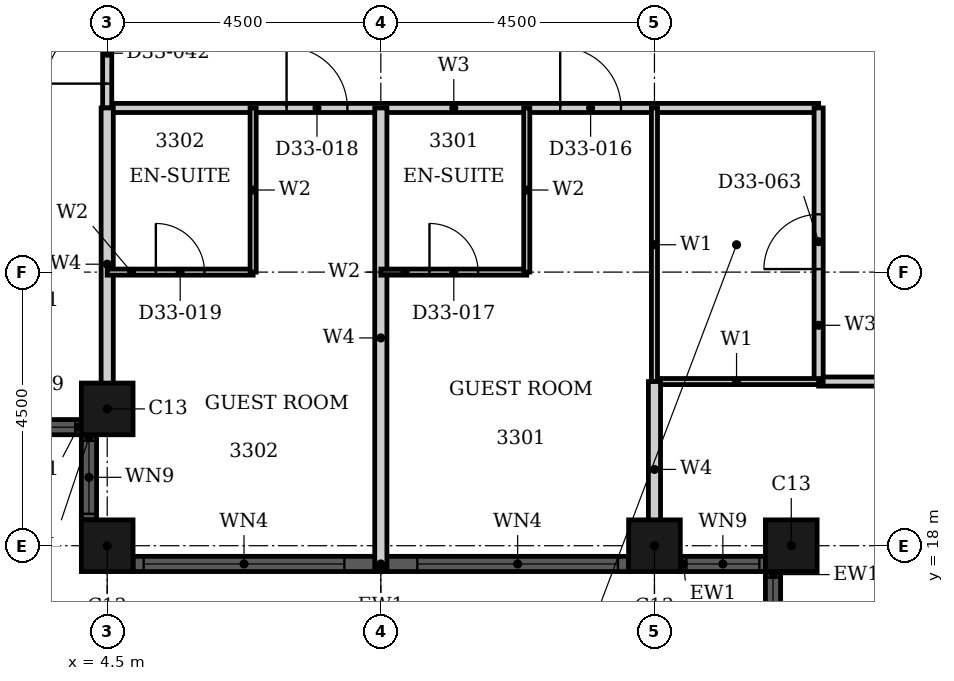
"""IFC4 building model, lengths in metres.
Left out: names, types, materials, properties, quantities, classifications, styles, units other than length and angle.
Written with IfcOpenShell. Run it as: python <this file> out.ifc"""

import sys

from ifc_helpers import new_model, si_unit, direction, frame, frame_2d, origin, origin_2d, place, context, subcontext, project, spatial, rectangle, hollow_rectangle, extrude, element, fill, save


model = new_model("IFC4")
c1 = context("Model", 3, precision=1e-05, world=origin(), true_north=direction((0.0, 1.0)))
c2 = subcontext(c1, "Body", "Model", "MODEL_VIEW")
j1 = project(units=[si_unit("LENGTHUNIT", "METRE"), si_unit("PLANEANGLEUNIT", "RADIAN")], contexts=[c1])
p1 = place(None, origin())
s1 = spatial("IfcSite", under=j1, at=p1, CompositionType="ELEMENT")
p2 = place(p1, origin())
s2 = spatial("IfcBuilding", under=s1, at=p2, CompositionType="ELEMENT")
p3 = place(p2, frame((0.0, 0.0, 133.2)))
s3 = spatial("IfcBuildingStorey", under=s2, at=p3, CompositionType="ELEMENT", Elevation=133.2)
for number, where, z_axis, x_axis in (
    (1, (4.5, 20.25, 0.0), (0.0, 0.0, 1.0), (1.0, 0.0, 0.0)),
    (2, (4.5, 18.0, 0.0), (0.0, 0.0, 1.0), (1.0, 0.0, 0.0)),
    (3, (13.5, 18.0, 0.0), (0.0, 0.0, 1.0), (1.0, 0.0, 0.0)),
    (4, (15.75, 18.0, 0.0), (0.0, 0.0, 1.0), (1.0, 0.0, 0.0)),
):
    element("IfcColumn", number, at=place(p3, frame(where, z_axis=z_axis, x_axis=x_axis)), inside=s3, PredefinedType="COLUMN", context=c2, shape_type="SweptSolid", body=[
        extrude(hollow_rectangle(XDim=0.85, YDim=0.85, WallThickness=0.026, at=origin_2d()), origin(), (0.0, 0.0, 1.0), 3.6),
    ])
p4 = place(p3, frame((2.675, 19.95, 0.0), z_axis=(0.0, 0.0, 1.0), x_axis=(1.0, 0.0, 0.0)))
e5 = element("IfcWall", 5, at=p4, inside=s3, PredefinedType="SOLIDWALL", context=c2, shape_type="SweptSolid", body=[
    extrude(rectangle(XDim=1.4, YDim=0.25, at=frame_2d((0.7, 0.0))), origin(), (0.0, 0.0, 1.0), 3.6),
])
p5 = place(p4, frame((0.1, 0.0, 0.9)))
e6 = element("IfcOpeningElement", 6, at=p5, cuts=e5, PredefinedType="OPENING", context=c2, shape_type="SweptSolid", body=[
    extrude(rectangle(XDim=1.2, YDim=2.08, at=frame_2d((0.6, 1.04))), frame((0.0, 0.135, 0.0), z_axis=(0.0, -1.0, 0.0), x_axis=(1.0, 0.0, 0.0)), (0.0, 0.0, 1.0), 0.27),
])
p6 = place(p3, frame((4.2, 19.825, 0.0), z_axis=(0.0, 0.0, 1.0), x_axis=(0.0, -1.0, 0.0)))
e7 = element("IfcWall", 7, at=p6, inside=s3, PredefinedType="SOLIDWALL", context=c2, shape_type="SweptSolid", body=[
    extrude(rectangle(XDim=1.4, YDim=0.25, at=frame_2d((0.7, 0.0))), origin(), (0.0, 0.0, 1.0), 3.6),
])
p7 = place(p6, frame((0.1, 0.0, 0.9)))
e8 = element("IfcOpeningElement", 8, at=p7, cuts=e7, PredefinedType="OPENING", context=c2, shape_type="SweptSolid", body=[
    extrude(rectangle(XDim=1.2, YDim=2.08, at=frame_2d((0.6, 1.04))), frame((0.0, 0.135, 0.0), z_axis=(0.0, -1.0, 0.0), x_axis=(1.0, 0.0, 0.0)), (0.0, 0.0, 1.0), 0.27),
])
p8 = place(p3, frame((4.925, 17.7, 0.0), z_axis=(0.0, 0.0, 1.0), x_axis=(1.0, 0.0, 0.0)))
e9 = element("IfcWall", 9, at=p8, inside=s3, PredefinedType="SOLIDWALL", context=c2, shape_type="SweptSolid", body=[
    extrude(rectangle(XDim=8.15, YDim=0.25, at=frame_2d((4.075, 0.0))), origin(), (0.0, 0.0, 1.0), 3.6),
])
p9 = place(p8, frame((0.175, 0.0, 0.9)))
e10 = element("IfcOpeningElement", 10, at=p9, cuts=e9, PredefinedType="OPENING", context=c2, shape_type="SweptSolid", body=[
    extrude(rectangle(XDim=3.3, YDim=2.08, at=frame_2d((1.65, 1.04))), frame((0.0, 0.135, 0.0), z_axis=(0.0, -1.0, 0.0), x_axis=(1.0, 0.0, 0.0)), (0.0, 0.0, 1.0), 0.27),
])
p10 = place(p8, frame((4.675, 0.0, 0.9)))
e11 = element("IfcOpeningElement", 11, at=p10, cuts=e9, PredefinedType="OPENING", context=c2, shape_type="SweptSolid", body=[
    extrude(rectangle(XDim=3.3, YDim=2.08, at=frame_2d((1.65, 1.04))), frame((0.0, 0.135, 0.0), z_axis=(0.0, -1.0, 0.0), x_axis=(1.0, 0.0, 0.0)), (0.0, 0.0, 1.0), 0.27),
])
p11 = place(p3, frame((13.925, 17.7, 0.0), z_axis=(0.0, 0.0, 1.0), x_axis=(1.0, 0.0, 0.0)))
e12 = element("IfcWall", 12, at=p11, inside=s3, PredefinedType="SOLIDWALL", context=c2, shape_type="SweptSolid", body=[
    extrude(rectangle(XDim=1.4, YDim=0.25, at=frame_2d((0.7, 0.0))), origin(), (0.0, 0.0, 1.0), 3.6),
])
p12 = place(p11, frame((0.1, 0.0, 0.9)))
e13 = element("IfcOpeningElement", 13, at=p12, cuts=e12, PredefinedType="OPENING", context=c2, shape_type="SweptSolid", body=[
    extrude(rectangle(XDim=1.2, YDim=2.08, at=frame_2d((0.6, 1.04))), frame((0.0, 0.135, 0.0), z_axis=(0.0, -1.0, 0.0), x_axis=(1.0, 0.0, 0.0)), (0.0, 0.0, 1.0), 0.27),
])
p13 = place(p3, frame((15.45, 17.575, 0.0), z_axis=(0.0, 0.0, 1.0), x_axis=(0.0, -1.0, 0.0)))
e14 = element("IfcWall", 14, at=p13, inside=s3, PredefinedType="SOLIDWALL", context=c2, shape_type="SweptSolid", body=[
    extrude(rectangle(XDim=1.4, YDim=0.25, at=frame_2d((0.7, 0.0))), origin(), (0.0, 0.0, 1.0), 3.6),
])
p14 = place(p13, frame((0.1, 0.0, 0.9)))
e15 = element("IfcOpeningElement", 15, at=p14, cuts=e14, PredefinedType="OPENING", context=c2, shape_type="SweptSolid", body=[
    extrude(rectangle(XDim=1.2, YDim=2.08, at=frame_2d((0.6, 1.04))), frame((0.0, 0.135, 0.0), z_axis=(0.0, -1.0, 0.0), x_axis=(1.0, 0.0, 0.0)), (0.0, 0.0, 1.0), 0.27),
])
p15 = place(p3, frame((16.2, 20.7, 0.0), z_axis=(0.0, 0.0, 1.0), x_axis=(1.0, 0.0, 0.0)))
e16 = element("IfcWall", 16, at=p15, inside=s3, PredefinedType="PARTITIONING", context=c2, shape_type="SweptSolid", body=[
    extrude(rectangle(XDim=13.5, YDim=0.15, at=frame_2d((6.75, 0.0))), origin(), (0.0, 0.0, 1.0), 3.3),
])
p16 = place(p15, frame((4.75, 0.0, 0.0)))
e17 = element("IfcOpeningElement", 17, at=p16, cuts=e16, PredefinedType="OPENING", context=c2, shape_type="SweptSolid", body=[
    extrude(rectangle(XDim=1.0, YDim=2.1, at=frame_2d((0.5, 1.05))), frame((0.0, 0.085, 0.0), z_axis=(0.0, -1.0, 0.0), x_axis=(1.0, 0.0, 0.0)), (0.0, 0.0, 1.0), 0.17),
])
p17 = place(p15, frame((9.45, 0.0, 0.0)))
e18 = element("IfcOpeningElement", 18, at=p17, cuts=e16, PredefinedType="OPENING", context=c2, shape_type="SweptSolid", body=[
    extrude(rectangle(XDim=0.9, YDim=2.1, at=frame_2d((0.45, 1.05))), frame((0.0, 0.085, 0.0), z_axis=(0.0, -1.0, 0.0), x_axis=(1.0, 0.0, 0.0)), (0.0, 0.0, 1.0), 0.17),
])
p18 = place(p3, frame((4.5, 25.2, 0.0), z_axis=(0.0, 0.0, 1.0), x_axis=(1.0, 0.0, 0.0)))
e19 = element("IfcWall", 19, at=p18, inside=s3, PredefinedType="PARTITIONING", context=c2, shape_type="SweptSolid", body=[
    extrude(rectangle(XDim=11.7, YDim=0.15, at=frame_2d((5.85, 0.0))), origin(), (0.0, 0.0, 1.0), 3.3),
])
p19 = place(p18, frame((7.45, 0.0, 0.0)))
e20 = element("IfcOpeningElement", 20, at=p19, cuts=e19, PredefinedType="OPENING", context=c2, shape_type="SweptSolid", body=[
    extrude(rectangle(XDim=1.0, YDim=2.1, at=frame_2d((0.5, 1.05))), frame((0.0, 0.085, 0.0), z_axis=(0.0, -1.0, 0.0), x_axis=(1.0, 0.0, 0.0)), (0.0, 0.0, 1.0), 0.17),
])
p20 = place(p18, frame((2.95, 0.0, 0.0)))
e21 = element("IfcOpeningElement", 21, at=p20, cuts=e19, PredefinedType="OPENING", context=c2, shape_type="SweptSolid", body=[
    extrude(rectangle(XDim=1.0, YDim=2.1, at=frame_2d((0.5, 1.05))), frame((0.0, 0.085, 0.0), z_axis=(0.0, -1.0, 0.0), x_axis=(1.0, 0.0, 0.0)), (0.0, 0.0, 1.0), 0.17),
])
p21 = place(p3, frame((16.2, 20.7, 0.0), z_axis=(0.0, 0.0, 1.0), x_axis=(0.0, 1.0, 0.0)))
e22 = element("IfcWall", 22, at=p21, inside=s3, PredefinedType="PARTITIONING", context=c2, shape_type="SweptSolid", body=[
    extrude(rectangle(XDim=4.5, YDim=0.15, at=frame_2d((2.25, 0.0))), origin(), (0.0, 0.0, 1.0), 3.3),
])
p22 = place(p21, frame((1.85, 0.0, 0.0)))
e23 = element("IfcOpeningElement", 23, at=p22, cuts=e22, PredefinedType="OPENING", context=c2, shape_type="SweptSolid", body=[
    extrude(rectangle(XDim=0.9, YDim=2.1, at=frame_2d((0.45, 1.05))), frame((0.0, 0.085, 0.0), z_axis=(0.0, -1.0, 0.0), x_axis=(1.0, 0.0, 0.0)), (0.0, 0.0, 1.0), 0.17),
])
p23 = place(p3, frame((4.5, 25.2, 0.0), z_axis=(0.0, 0.0, 1.0), x_axis=(0.0, 1.0, 0.0)))
e24 = element("IfcWall", 24, at=p23, inside=s3, PredefinedType="PARTITIONING", context=c2, shape_type="SweptSolid", body=[
    extrude(rectangle(XDim=1.8, YDim=0.15, at=frame_2d((0.9, 0.0))), origin(), (0.0, 0.0, 1.0), 3.3),
])
p24 = place(p23, frame((0.4, 0.0, 0.0)))
e25 = element("IfcOpeningElement", 25, at=p24, cuts=e24, PredefinedType="OPENING", context=c2, shape_type="SweptSolid", body=[
    extrude(rectangle(XDim=1.0, YDim=2.1, at=frame_2d((0.5, 1.05))), frame((0.0, 0.085, 0.0), z_axis=(0.0, -1.0, 0.0), x_axis=(1.0, 0.0, 0.0)), (0.0, 0.0, 1.0), 0.17),
])
p25 = place(p3, frame((13.5, 20.7, 0.0), z_axis=(0.0, 0.0, 1.0), x_axis=(1.0, 0.0, 0.0)))
e26 = element("IfcWall", 26, at=p25, inside=s3, PredefinedType="PARTITIONING", context=c2, shape_type="SweptSolid", body=[
    extrude(rectangle(XDim=2.7, YDim=0.1, at=frame_2d((1.35, 0.0))), origin(), (0.0, 0.0, 1.0), 3.3),
])
p26 = place(p3, frame((13.5, 20.7, 0.0), z_axis=(0.0, 0.0, 1.0), x_axis=(0.0, 1.0, 0.0)))
e27 = element("IfcWall", 27, at=p26, inside=s3, PredefinedType="PARTITIONING", context=c2, shape_type="SweptSolid", body=[
    extrude(rectangle(XDim=4.5, YDim=0.1, at=frame_2d((2.25, 0.0))), origin(), (0.0, 0.0, 1.0), 2.38),
])
p27 = place(p3, frame((13.5, 17.81, 0.0), z_axis=(0.0, 0.0, 1.0), x_axis=(0.0, 1.0, 0.0)))
e28 = element("IfcWall", 28, at=p27, inside=s3, PredefinedType="PARTITIONING", context=c2, shape_type="SweptSolid", body=[
    extrude(rectangle(XDim=2.89, YDim=0.2, at=frame_2d((1.445, 0.0))), origin(), (0.0, 0.0, 1.0), 2.38),
])
p28 = place(p3, frame((4.5, 20.06, 0.0), z_axis=(0.0, 0.0, 1.0), x_axis=(0.0, 1.0, 0.0)))
e29 = element("IfcWall", 29, at=p28, inside=s3, PredefinedType="PARTITIONING", context=c2, shape_type="SweptSolid", body=[
    extrude(rectangle(XDim=5.14, YDim=0.2, at=frame_2d((2.57, 0.0))), origin(), (0.0, 0.0, 1.0), 3.3),
])
p29 = place(p3, frame((9.0, 17.635, 0.0), z_axis=(0.0, 0.0, 1.0), x_axis=(0.0, 1.0, 0.0)))
e30 = element("IfcWall", 30, at=p29, inside=s3, PredefinedType="PARTITIONING", context=c2, shape_type="SweptSolid", body=[
    extrude(rectangle(XDim=7.565, YDim=0.2, at=frame_2d((3.782, 0.0))), origin(), (0.0, 0.0, 1.0), 3.3),
])
p30 = place(p3, frame((9.0, 22.5, 0.0), z_axis=(0.0, 0.0, 1.0), x_axis=(1.0, 0.0, 0.0)))
e31 = element("IfcWall", 31, at=p30, inside=s3, PredefinedType="PARTITIONING", context=c2, shape_type="SweptSolid", body=[
    extrude(rectangle(XDim=2.4, YDim=0.1, at=frame_2d((1.2, 0.0))), origin(), (0.0, 0.0, 1.0), 2.58),
])
p31 = place(p30, frame((0.8, 0.0, 0.0)))
e32 = element("IfcOpeningElement", 32, at=p31, cuts=e31, PredefinedType="OPENING", context=c2, shape_type="SweptSolid", body=[
    extrude(rectangle(XDim=0.8, YDim=2.1, at=frame_2d((0.4, 1.05))), frame((0.0, 0.06, 0.0), z_axis=(0.0, -1.0, 0.0), x_axis=(1.0, 0.0, 0.0)), (0.0, 0.0, 1.0), 0.12),
])
p32 = place(p3, frame((4.5, 22.5, 0.0), z_axis=(0.0, 0.0, 1.0), x_axis=(1.0, 0.0, 0.0)))
e33 = element("IfcWall", 33, at=p32, inside=s3, PredefinedType="PARTITIONING", context=c2, shape_type="SweptSolid", body=[
    extrude(rectangle(XDim=2.4, YDim=0.1, at=frame_2d((1.2, 0.0))), origin(), (0.0, 0.0, 1.0), 2.58),
])
p33 = place(p32, frame((0.8, 0.0, 0.0)))
e34 = element("IfcOpeningElement", 34, at=p33, cuts=e33, PredefinedType="OPENING", context=c2, shape_type="SweptSolid", body=[
    extrude(rectangle(XDim=0.8, YDim=2.1, at=frame_2d((0.4, 1.05))), frame((0.0, 0.06, 0.0), z_axis=(0.0, -1.0, 0.0), x_axis=(1.0, 0.0, 0.0)), (0.0, 0.0, 1.0), 0.12),
])
for number, where, z_axis, x_axis in (
    (35, (11.4, 22.5, 0.0), (0.0, 0.0, 1.0), (0.0, 1.0, 0.0)),
    (36, (6.9, 22.5, 0.0), (0.0, 0.0, 1.0), (0.0, 1.0, 0.0)),
):
    element("IfcWall", number, at=place(p3, frame(where, z_axis=z_axis, x_axis=x_axis)), inside=s3, PredefinedType="PARTITIONING", context=c2, shape_type="SweptSolid", body=[
        extrude(rectangle(XDim=2.7, YDim=0.1, at=frame_2d((1.35, 0.0))), origin(), (0.0, 0.0, 1.0), 3.3),
    ])
p34 = place(p5, origin())
e37 = element("IfcWindow", 37, at=p34, inside=s3, PartitioningType="SINGLE_PANEL", PredefinedType="WINDOW", context=c2, shape_type="SweptSolid", body=[
    extrude(rectangle(XDim=1.2, YDim=2.08, at=frame_2d((0.6, 1.04))), frame((0.0, 0.03, 0.0), z_axis=(0.0, -1.0, 0.0), x_axis=(1.0, 0.0, 0.0)), (0.0, 0.0, 1.0), 0.06),
])
fill(e6, e37)
p35 = place(p7, origin())
e38 = element("IfcWindow", 38, at=p35, inside=s3, PartitioningType="SINGLE_PANEL", PredefinedType="WINDOW", context=c2, shape_type="SweptSolid", body=[
    extrude(rectangle(XDim=1.2, YDim=2.08, at=frame_2d((0.6, 1.04))), frame((0.0, 0.03, 0.0), z_axis=(0.0, -1.0, 0.0), x_axis=(1.0, 0.0, 0.0)), (0.0, 0.0, 1.0), 0.06),
])
fill(e8, e38)
p36 = place(p9, origin())
e39 = element("IfcWindow", 39, at=p36, inside=s3, PartitioningType="SINGLE_PANEL", PredefinedType="WINDOW", context=c2, shape_type="SweptSolid", body=[
    extrude(rectangle(XDim=3.3, YDim=2.08, at=frame_2d((1.65, 1.04))), frame((0.0, 0.03, 0.0), z_axis=(0.0, -1.0, 0.0), x_axis=(1.0, 0.0, 0.0)), (0.0, 0.0, 1.0), 0.06),
])
fill(e10, e39)
p37 = place(p10, origin())
e40 = element("IfcWindow", 40, at=p37, inside=s3, PartitioningType="SINGLE_PANEL", PredefinedType="WINDOW", context=c2, shape_type="SweptSolid", body=[
    extrude(rectangle(XDim=3.3, YDim=2.08, at=frame_2d((1.65, 1.04))), frame((0.0, 0.03, 0.0), z_axis=(0.0, -1.0, 0.0), x_axis=(1.0, 0.0, 0.0)), (0.0, 0.0, 1.0), 0.06),
])
fill(e11, e40)
p38 = place(p12, origin())
e41 = element("IfcWindow", 41, at=p38, inside=s3, PartitioningType="SINGLE_PANEL", PredefinedType="WINDOW", context=c2, shape_type="SweptSolid", body=[
    extrude(rectangle(XDim=1.2, YDim=2.08, at=frame_2d((0.6, 1.04))), frame((0.0, 0.03, 0.0), z_axis=(0.0, -1.0, 0.0), x_axis=(1.0, 0.0, 0.0)), (0.0, 0.0, 1.0), 0.06),
])
fill(e13, e41)
p39 = place(p14, origin())
e42 = element("IfcWindow", 42, at=p39, inside=s3, PartitioningType="SINGLE_PANEL", PredefinedType="WINDOW", context=c2, shape_type="SweptSolid", body=[
    extrude(rectangle(XDim=1.2, YDim=2.08, at=frame_2d((0.6, 1.04))), frame((0.0, 0.03, 0.0), z_axis=(0.0, -1.0, 0.0), x_axis=(1.0, 0.0, 0.0)), (0.0, 0.0, 1.0), 0.06),
])
fill(e15, e42)
p40 = place(p19, origin())
e43 = element("IfcDoor", 43, at=p40, inside=s3, OperationType="SINGLE_SWING_RIGHT", PredefinedType="DOOR", context=c2, shape_type="SweptSolid", body=[
    extrude(rectangle(XDim=1.0, YDim=2.1, at=frame_2d((0.5, 1.05))), frame((0.0, 0.025, 0.0), z_axis=(0.0, -1.0, 0.0), x_axis=(1.0, 0.0, 0.0)), (0.0, 0.0, 1.0), 0.05),
])
fill(e20, e43)
p41 = place(p31, origin())
e44 = element("IfcDoor", 44, at=p41, inside=s3, OperationType="SINGLE_SWING_LEFT", PredefinedType="DOOR", context=c2, shape_type="SweptSolid", body=[
    extrude(rectangle(XDim=0.8, YDim=2.1, at=frame_2d((0.4, 1.05))), frame((0.0, 0.025, 0.0), z_axis=(0.0, -1.0, 0.0), x_axis=(1.0, 0.0, 0.0)), (0.0, 0.0, 1.0), 0.05),
])
fill(e32, e44)
p42 = place(p20, origin())
e45 = element("IfcDoor", 45, at=p42, inside=s3, OperationType="SINGLE_SWING_RIGHT", PredefinedType="DOOR", context=c2, shape_type="SweptSolid", body=[
    extrude(rectangle(XDim=1.0, YDim=2.1, at=frame_2d((0.5, 1.05))), frame((0.0, 0.025, 0.0), z_axis=(0.0, -1.0, 0.0), x_axis=(1.0, 0.0, 0.0)), (0.0, 0.0, 1.0), 0.05),
])
fill(e21, e45)
p43 = place(p33, origin())
e46 = element("IfcDoor", 46, at=p43, inside=s3, OperationType="SINGLE_SWING_RIGHT", PredefinedType="DOOR", context=c2, shape_type="SweptSolid", body=[
    extrude(rectangle(XDim=0.8, YDim=2.1, at=frame_2d((0.4, 1.05))), frame((0.0, 0.025, 0.0), z_axis=(0.0, -1.0, 0.0), x_axis=(1.0, 0.0, 0.0)), (0.0, 0.0, 1.0), 0.05),
])
fill(e34, e46)
p44 = place(p24, origin())
e47 = element("IfcDoor", 47, at=p44, inside=s3, OperationType="SINGLE_SWING_LEFT", PredefinedType="DOOR", context=c2, shape_type="SweptSolid", body=[
    extrude(rectangle(XDim=1.0, YDim=2.1, at=frame_2d((0.5, 1.05))), frame((0.0, 0.025, 0.0), z_axis=(0.0, -1.0, 0.0), x_axis=(1.0, 0.0, 0.0)), (0.0, 0.0, 1.0), 0.05),
])
fill(e25, e47)
p45 = place(p22, origin())
e48 = element("IfcDoor", 48, at=p45, inside=s3, OperationType="SINGLE_SWING_RIGHT", PredefinedType="DOOR", context=c2, shape_type="SweptSolid", body=[
    extrude(rectangle(XDim=0.9, YDim=2.1, at=frame_2d((0.45, 1.05))), frame((0.0, 0.025, 0.0), z_axis=(0.0, -1.0, 0.0), x_axis=(1.0, 0.0, 0.0)), (0.0, 0.0, 1.0), 0.05),
])
fill(e23, e48)
save(model, sys.argv[1])
